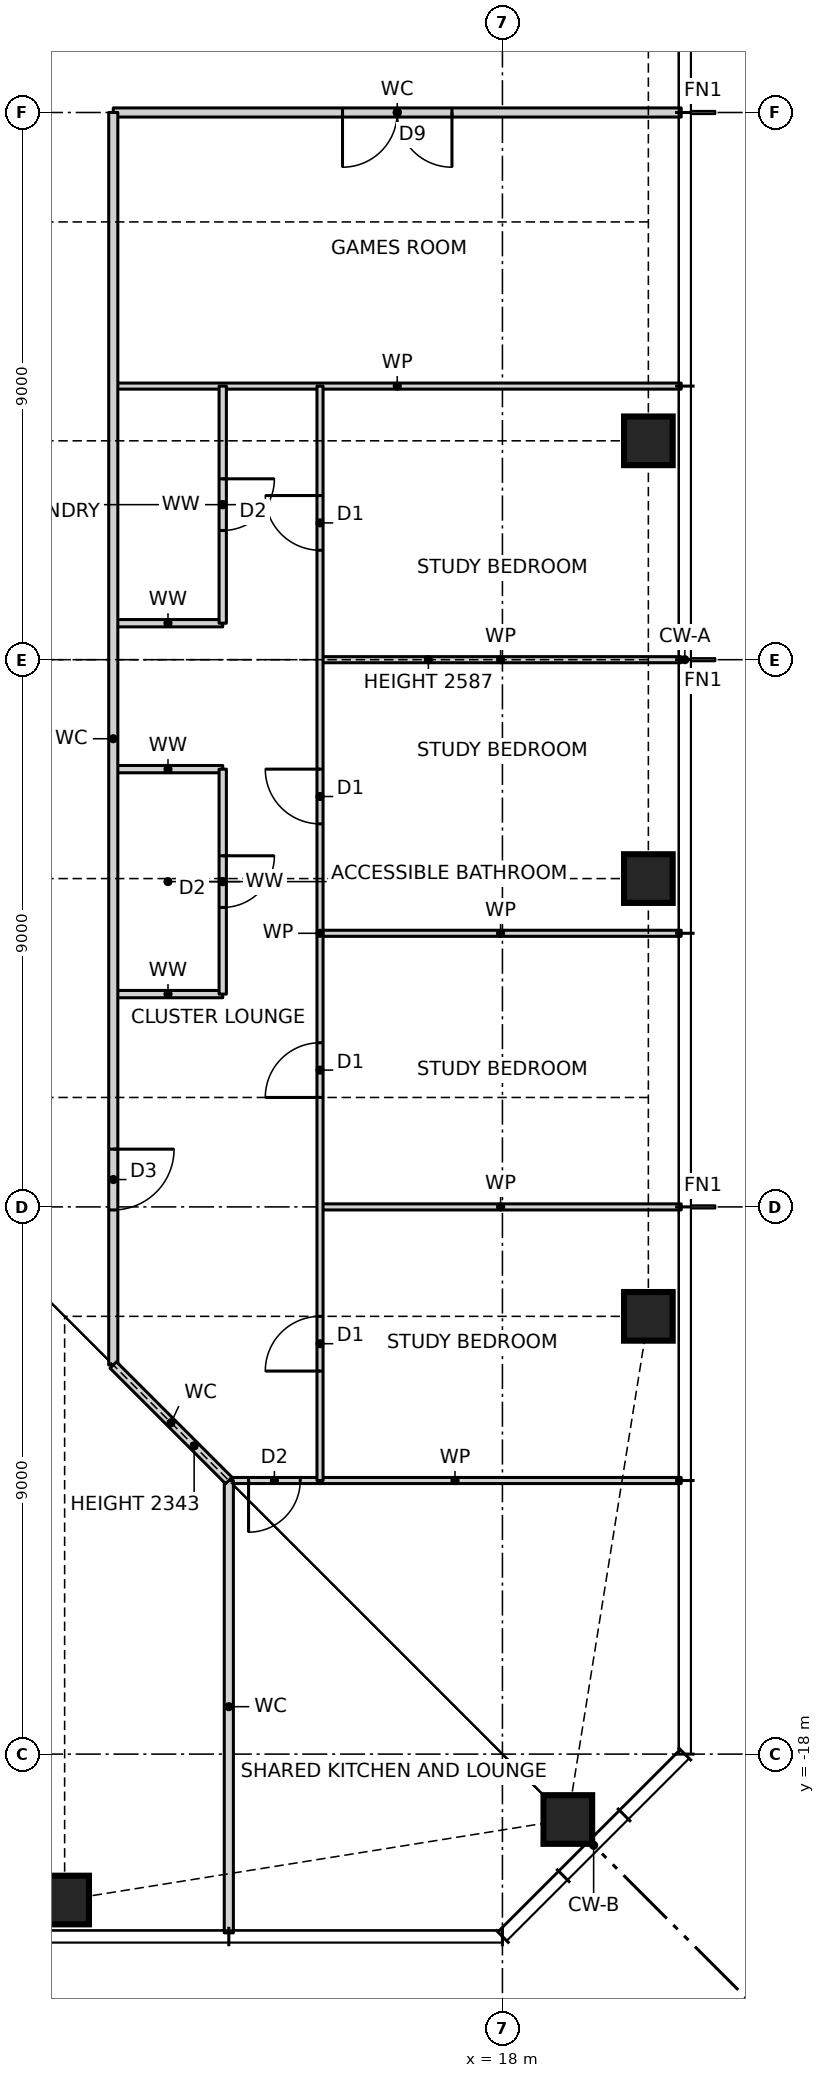
"""IFC4 building model, lengths in metres.
Left out: names, types, materials, properties, quantities, classifications, styles, units other than length and angle.
Written with IfcOpenShell. Run it as: python <this file> out.ifc"""

import sys

from ifc_helpers import new_model, si_unit, direction, frame, frame_2d, origin, origin_2d, place, context, subcontext, project, spatial, rectangle, hollow_rectangle, extrude, element, fill, save


model = new_model("IFC4")
c1 = context("Model", 3, precision=1e-05, world=origin(), true_north=direction((0.0, 1.0)))
c2 = subcontext(c1, "Body", "Model", "MODEL_VIEW")
j1 = project(units=[si_unit("LENGTHUNIT", "METRE"), si_unit("PLANEANGLEUNIT", "RADIAN")], contexts=[c1])
p1 = place(None, origin())
s1 = spatial("IfcSite", under=j1, at=p1, CompositionType="ELEMENT")
p2 = place(p1, origin())
s2 = spatial("IfcBuilding", under=s1, at=p2, CompositionType="ELEMENT")
p3 = place(p2, frame((0.0, 0.0, 105.0)))
s3 = spatial("IfcBuildingStorey", under=s2, at=p3, CompositionType="ELEMENT", Elevation=105.0)
for number, where, z_axis, x_axis in (
    (1, (10.8, -20.4, 0.0), (0.0, 0.0, 1.0), (1.0, 0.0, 0.0)),
    (2, (19.076, -19.076, 0.0), (0.0, 0.0, 1.0), (1.0, 0.0, 0.0)),
    (3, (20.4, -10.8, 0.0), (0.0, 0.0, 1.0), (1.0, 0.0, 0.0)),
    (4, (20.4, -3.6, 0.0), (0.0, 0.0, 1.0), (1.0, 0.0, 0.0)),
    (5, (20.4, 3.6, 0.0), (0.0, 0.0, 1.0), (1.0, 0.0, 0.0)),
):
    element("IfcColumn", number, at=place(p3, frame(where, z_axis=z_axis, x_axis=x_axis)), inside=s3, PredefinedType="COLUMN", context=c2, shape_type="SweptSolid", body=[
        extrude(hollow_rectangle(XDim=0.8, YDim=0.8, WallThickness=0.07, at=origin_2d()), origin(), (0.0, 0.0, 1.0), 3.5),
    ])
p4 = place(p3, frame((13.5, -13.5, 0.0), z_axis=(0.0, 0.0, 1.0), x_axis=(1.0, 0.0, 0.0)))
e6 = element("IfcWall", 6, at=p4, inside=s3, PredefinedType="PARTITIONING", context=c2, shape_type="SweptSolid", body=[
    extrude(rectangle(XDim=7.44, YDim=0.1, at=frame_2d((3.72, 0.0))), origin(), (0.0, 0.0, 1.0), 3.27),
])
p5 = place(p4, frame((0.325, 0.0, 0.0)))
e7 = element("IfcOpeningElement", 7, at=p5, cuts=e6, PredefinedType="OPENING", context=c2, shape_type="SweptSolid", body=[
    extrude(rectangle(XDim=0.85, YDim=2.1, at=frame_2d((0.425, 1.05))), frame((0.0, 0.06, 0.0), z_axis=(0.0, -1.0, 0.0), x_axis=(1.0, 0.0, 0.0)), (0.0, 0.0, 1.0), 0.12),
])
p6 = place(p3, frame((15.0, -9.0, 0.0), z_axis=(0.0, 0.0, 1.0), x_axis=(1.0, 0.0, 0.0)))
e8 = element("IfcWall", 8, at=p6, inside=s3, PredefinedType="PARTITIONING", context=c2, shape_type="SweptSolid", body=[
    extrude(rectangle(XDim=5.94, YDim=0.1, at=frame_2d((2.97, 0.0))), origin(), (0.0, 0.0, 1.0), 3.27),
])
p7 = place(p3, frame((11.6, -5.5, 0.0), z_axis=(0.0, 0.0, 1.0), x_axis=(1.0, 0.0, 0.0)))
e9 = element("IfcWall", 9, at=p7, inside=s3, PredefinedType="PARTITIONING", context=c2, shape_type="SweptSolid", body=[
    extrude(rectangle(XDim=1.8, YDim=0.12, at=frame_2d((0.9, 0.0))), origin(), (0.0, 0.0, 1.0), 3.27),
])
p8 = place(p3, frame((15.0, -4.5, 0.0), z_axis=(0.0, 0.0, 1.0), x_axis=(1.0, 0.0, 0.0)))
e10 = element("IfcWall", 10, at=p8, inside=s3, PredefinedType="PARTITIONING", context=c2, shape_type="SweptSolid", body=[
    extrude(rectangle(XDim=5.94, YDim=0.1, at=frame_2d((2.97, 0.0))), origin(), (0.0, 0.0, 1.0), 3.27),
])
p9 = place(p3, frame((11.6, -1.8, 0.0), z_axis=(0.0, 0.0, 1.0), x_axis=(1.0, 0.0, 0.0)))
e11 = element("IfcWall", 11, at=p9, inside=s3, PredefinedType="PARTITIONING", context=c2, shape_type="SweptSolid", body=[
    extrude(rectangle(XDim=1.8, YDim=0.12, at=frame_2d((0.9, 0.0))), origin(), (0.0, 0.0, 1.0), 3.27),
])
p10 = place(p3, frame((15.0, 0.0, 0.0), z_axis=(0.0, 0.0, 1.0), x_axis=(1.0, 0.0, 0.0)))
e12 = element("IfcWall", 12, at=p10, inside=s3, PredefinedType="PARTITIONING", context=c2, shape_type="SweptSolid", body=[
    extrude(rectangle(XDim=5.94, YDim=0.1, at=frame_2d((2.97, 0.0))), origin(), (0.0, 0.0, 1.0), 2.587),
])
p11 = place(p3, frame((11.6, 0.6, 0.0), z_axis=(0.0, 0.0, 1.0), x_axis=(1.0, 0.0, 0.0)))
e13 = element("IfcWall", 13, at=p11, inside=s3, PredefinedType="PARTITIONING", context=c2, shape_type="SweptSolid", body=[
    extrude(rectangle(XDim=1.8, YDim=0.12, at=frame_2d((0.9, 0.0))), origin(), (0.0, 0.0, 1.0), 3.27),
])
p12 = place(p3, frame((11.6, 4.5, 0.0), z_axis=(0.0, 0.0, 1.0), x_axis=(1.0, 0.0, 0.0)))
e14 = element("IfcWall", 14, at=p12, inside=s3, PredefinedType="PARTITIONING", context=c2, shape_type="SweptSolid", body=[
    extrude(rectangle(XDim=9.34, YDim=0.1, at=frame_2d((4.67, 0.0))), origin(), (0.0, 0.0, 1.0), 3.27),
])
p13 = place(p3, frame((11.6, 9.0, 0.0), z_axis=(0.0, 0.0, 1.0), x_axis=(1.0, 0.0, 0.0)))
e15 = element("IfcWall", 15, at=p13, inside=s3, PredefinedType="PARTITIONING", context=c2, shape_type="SweptSolid", body=[
    extrude(rectangle(XDim=9.34, YDim=0.15, at=frame_2d((4.67, 0.0))), origin(), (0.0, 0.0, 1.0), 3.27),
])
p14 = place(p13, frame((3.77, 0.0, 0.0)))
e16 = element("IfcOpeningElement", 16, at=p14, cuts=e15, PredefinedType="OPENING", context=c2, shape_type="SweptSolid", body=[
    extrude(rectangle(XDim=1.8, YDim=2.1, at=frame_2d((0.9, 1.05))), frame((0.0, 0.085, 0.0), z_axis=(0.0, -1.0, 0.0), x_axis=(1.0, 0.0, 0.0)), (0.0, 0.0, 1.0), 0.17),
])
p15 = place(p3, frame((15.0, -13.5, 0.0), z_axis=(0.0, 0.0, 1.0), x_axis=(0.0, 1.0, 0.0)))
e17 = element("IfcWall", 17, at=p15, inside=s3, PredefinedType="PARTITIONING", context=c2, shape_type="SweptSolid", body=[
    extrude(rectangle(XDim=18.0, YDim=0.1, at=frame_2d((9.0, 0.0))), origin(), (0.0, 0.0, 1.0), 3.27),
])
p16 = place(p15, frame((1.8, 0.0, 0.0)))
e18 = element("IfcOpeningElement", 18, at=p16, cuts=e17, PredefinedType="OPENING", context=c2, shape_type="SweptSolid", body=[
    extrude(rectangle(XDim=0.9, YDim=2.1, at=frame_2d((0.45, 1.05))), frame((0.0, 0.06, 0.0), z_axis=(0.0, -1.0, 0.0), x_axis=(1.0, 0.0, 0.0)), (0.0, 0.0, 1.0), 0.12),
])
p17 = place(p15, frame((6.3, 0.0, 0.0)))
e19 = element("IfcOpeningElement", 19, at=p17, cuts=e17, PredefinedType="OPENING", context=c2, shape_type="SweptSolid", body=[
    extrude(rectangle(XDim=0.9, YDim=2.1, at=frame_2d((0.45, 1.05))), frame((0.0, 0.06, 0.0), z_axis=(0.0, -1.0, 0.0), x_axis=(1.0, 0.0, 0.0)), (0.0, 0.0, 1.0), 0.12),
])
p18 = place(p15, frame((10.8, 0.0, 0.0)))
e20 = element("IfcOpeningElement", 20, at=p18, cuts=e17, PredefinedType="OPENING", context=c2, shape_type="SweptSolid", body=[
    extrude(rectangle(XDim=0.9, YDim=2.1, at=frame_2d((0.45, 1.05))), frame((0.0, 0.06, 0.0), z_axis=(0.0, -1.0, 0.0), x_axis=(1.0, 0.0, 0.0)), (0.0, 0.0, 1.0), 0.12),
])
p19 = place(p15, frame((15.3, 0.0, 0.0)))
e21 = element("IfcOpeningElement", 21, at=p19, cuts=e17, PredefinedType="OPENING", context=c2, shape_type="SweptSolid", body=[
    extrude(rectangle(XDim=0.9, YDim=2.1, at=frame_2d((0.45, 1.05))), frame((0.0, 0.06, 0.0), z_axis=(0.0, -1.0, 0.0), x_axis=(1.0, 0.0, 0.0)), (0.0, 0.0, 1.0), 0.12),
])
p20 = place(p3, frame((13.5, -20.94, 0.0), z_axis=(0.0, 0.0, 1.0), x_axis=(0.0, 1.0, 0.0)))
e22 = element("IfcWall", 22, at=p20, inside=s3, PredefinedType="PARTITIONING", context=c2, shape_type="SweptSolid", body=[
    extrude(rectangle(XDim=7.44, YDim=0.15, at=frame_2d((3.72, 0.0))), origin(), (0.0, 0.0, 1.0), 3.27),
])
p21 = place(p3, frame((13.4, -5.5, 0.0), z_axis=(0.0, 0.0, 1.0), x_axis=(0.0, 1.0, 0.0)))
e23 = element("IfcWall", 23, at=p21, inside=s3, PredefinedType="PARTITIONING", context=c2, shape_type="SweptSolid", body=[
    extrude(rectangle(XDim=3.7, YDim=0.12, at=frame_2d((1.85, 0.0))), origin(), (0.0, 0.0, 1.0), 3.27),
])
p22 = place(p21, frame((1.425, 0.0, 0.0)))
e24 = element("IfcOpeningElement", 24, at=p22, cuts=e23, PredefinedType="OPENING", context=c2, shape_type="SweptSolid", body=[
    extrude(rectangle(XDim=0.85, YDim=2.1, at=frame_2d((0.425, 1.05))), frame((0.0, 0.07, 0.0), z_axis=(0.0, -1.0, 0.0), x_axis=(1.0, 0.0, 0.0)), (0.0, 0.0, 1.0), 0.14),
])
p23 = place(p3, frame((13.4, 0.6, 0.0), z_axis=(0.0, 0.0, 1.0), x_axis=(0.0, 1.0, 0.0)))
e25 = element("IfcWall", 25, at=p23, inside=s3, PredefinedType="PARTITIONING", context=c2, shape_type="SweptSolid", body=[
    extrude(rectangle(XDim=3.9, YDim=0.12, at=frame_2d((1.95, 0.0))), origin(), (0.0, 0.0, 1.0), 3.27),
])
p24 = place(p23, frame((1.525, 0.0, 0.0)))
e26 = element("IfcOpeningElement", 26, at=p24, cuts=e25, PredefinedType="OPENING", context=c2, shape_type="SweptSolid", body=[
    extrude(rectangle(XDim=0.85, YDim=2.1, at=frame_2d((0.425, 1.05))), frame((0.0, 0.07, 0.0), z_axis=(0.0, -1.0, 0.0), x_axis=(1.0, 0.0, 0.0)), (0.0, 0.0, 1.0), 0.14),
])
p25 = place(p3, frame((11.6, -11.6, 0.0), z_axis=(0.0, 0.0, 1.0), x_axis=(0.0, 1.0, 0.0)))
e27 = element("IfcWall", 27, at=p25, inside=s3, PredefinedType="PARTITIONING", context=c2, shape_type="SweptSolid", body=[
    extrude(rectangle(XDim=20.6, YDim=0.15, at=frame_2d((10.3, 0.0))), origin(), (0.0, 0.0, 1.0), 3.27),
])
p26 = place(p25, frame((2.55, 0.0, 0.0)))
e28 = element("IfcOpeningElement", 28, at=p26, cuts=e27, PredefinedType="OPENING", context=c2, shape_type="SweptSolid", body=[
    extrude(rectangle(XDim=1.0, YDim=2.1, at=frame_2d((0.5, 1.05))), frame((0.0, 0.085, 0.0), z_axis=(0.0, -1.0, 0.0), x_axis=(1.0, 0.0, 0.0)), (0.0, 0.0, 1.0), 0.17),
])
p27 = place(p3, frame((13.5, -13.5, 0.0), z_axis=(0.0, 0.0, 1.0), x_axis=(-0.707106781187, 0.707106781187, 0.0)))
e29 = element("IfcWall", 29, at=p27, inside=s3, PredefinedType="PARTITIONING", context=c2, shape_type="SweptSolid", body=[
    extrude(rectangle(XDim=2.687, YDim=0.15, at=frame_2d((1.343, 0.0))), origin(), (0.0, 0.0, 1.0), 2.343),
])
p28 = place(p16, origin())
e30 = element("IfcDoor", 30, at=p28, inside=s3, OperationType="SINGLE_SWING_LEFT", PredefinedType="DOOR", context=c2, shape_type="SweptSolid", body=[
    extrude(rectangle(XDim=0.9, YDim=2.1, at=frame_2d((0.45, 1.05))), frame((0.0, 0.025, 0.0), z_axis=(0.0, -1.0, 0.0), x_axis=(1.0, 0.0, 0.0)), (0.0, 0.0, 1.0), 0.05),
])
fill(e18, e30)
p29 = place(p17, origin())
e31 = element("IfcDoor", 31, at=p29, inside=s3, OperationType="SINGLE_SWING_LEFT", PredefinedType="DOOR", context=c2, shape_type="SweptSolid", body=[
    extrude(rectangle(XDim=0.9, YDim=2.1, at=frame_2d((0.45, 1.05))), frame((0.0, 0.025, 0.0), z_axis=(0.0, -1.0, 0.0), x_axis=(1.0, 0.0, 0.0)), (0.0, 0.0, 1.0), 0.05),
])
fill(e19, e31)
p30 = place(p18, origin())
e32 = element("IfcDoor", 32, at=p30, inside=s3, OperationType="SINGLE_SWING_RIGHT", PredefinedType="DOOR", context=c2, shape_type="SweptSolid", body=[
    extrude(rectangle(XDim=0.9, YDim=2.1, at=frame_2d((0.45, 1.05))), frame((0.0, 0.025, 0.0), z_axis=(0.0, -1.0, 0.0), x_axis=(1.0, 0.0, 0.0)), (0.0, 0.0, 1.0), 0.05),
])
fill(e20, e32)
p31 = place(p19, origin())
e33 = element("IfcDoor", 33, at=p31, inside=s3, OperationType="SINGLE_SWING_RIGHT", PredefinedType="DOOR", context=c2, shape_type="SweptSolid", body=[
    extrude(rectangle(XDim=0.9, YDim=2.1, at=frame_2d((0.45, 1.05))), frame((0.0, 0.025, 0.0), z_axis=(0.0, -1.0, 0.0), x_axis=(1.0, 0.0, 0.0)), (0.0, 0.0, 1.0), 0.05),
])
fill(e21, e33)
p32 = place(p26, frame((1.0, 0.0, 0.0), z_axis=(0.0, 0.0, 1.0), x_axis=(-1.0, 0.0, 0.0)))
e34 = element("IfcDoor", 34, at=p32, inside=s3, OperationType="SINGLE_SWING_LEFT", PredefinedType="DOOR", context=c2, shape_type="SweptSolid", body=[
    extrude(rectangle(XDim=1.0, YDim=2.1, at=frame_2d((0.5, 1.05))), frame((0.0, 0.025, 0.0), z_axis=(0.0, -1.0, 0.0), x_axis=(1.0, 0.0, 0.0)), (0.0, 0.0, 1.0), 0.05),
])
fill(e28, e34)
p33 = place(p22, frame((0.85, 0.0, 0.0), z_axis=(0.0, 0.0, 1.0), x_axis=(-1.0, 0.0, 0.0)))
e35 = element("IfcDoor", 35, at=p33, inside=s3, OperationType="SINGLE_SWING_LEFT", PredefinedType="DOOR", context=c2, shape_type="SweptSolid", body=[
    extrude(rectangle(XDim=0.85, YDim=2.1, at=frame_2d((0.425, 1.05))), frame((0.0, 0.025, 0.0), z_axis=(0.0, -1.0, 0.0), x_axis=(1.0, 0.0, 0.0)), (0.0, 0.0, 1.0), 0.05),
])
fill(e24, e35)
p34 = place(p24, frame((0.85, 0.0, 0.0), z_axis=(0.0, 0.0, 1.0), x_axis=(-1.0, 0.0, 0.0)))
e36 = element("IfcDoor", 36, at=p34, inside=s3, OperationType="SINGLE_SWING_LEFT", PredefinedType="DOOR", context=c2, shape_type="SweptSolid", body=[
    extrude(rectangle(XDim=0.85, YDim=2.1, at=frame_2d((0.425, 1.05))), frame((0.0, 0.025, 0.0), z_axis=(0.0, -1.0, 0.0), x_axis=(1.0, 0.0, 0.0)), (0.0, 0.0, 1.0), 0.05),
])
fill(e26, e36)
p35 = place(p14, frame((1.8, 0.0, 0.0), z_axis=(0.0, 0.0, 1.0), x_axis=(-1.0, 0.0, 0.0)))
e37 = element("IfcDoor", 37, at=p35, inside=s3, OperationType="DOUBLE_DOOR_SINGLE_SWING", PredefinedType="DOOR", context=c2, shape_type="SweptSolid", body=[
    extrude(rectangle(XDim=1.8, YDim=2.1, at=frame_2d((0.9, 1.05))), frame((0.0, 0.025, 0.0), z_axis=(0.0, -1.0, 0.0), x_axis=(1.0, 0.0, 0.0)), (0.0, 0.0, 1.0), 0.05),
])
fill(e16, e37)
p36 = place(p5, frame((0.85, 0.0, 0.0), z_axis=(0.0, 0.0, 1.0), x_axis=(-1.0, 0.0, 0.0)))
e38 = element("IfcDoor", 38, at=p36, inside=s3, OperationType="SINGLE_SWING_RIGHT", PredefinedType="DOOR", context=c2, shape_type="SweptSolid", body=[
    extrude(rectangle(XDim=0.85, YDim=2.1, at=frame_2d((0.425, 1.05))), frame((0.0, 0.025, 0.0), z_axis=(0.0, -1.0, 0.0), x_axis=(1.0, 0.0, 0.0)), (0.0, 0.0, 1.0), 0.05),
])
fill(e7, e38)
save(model, sys.argv[1])
